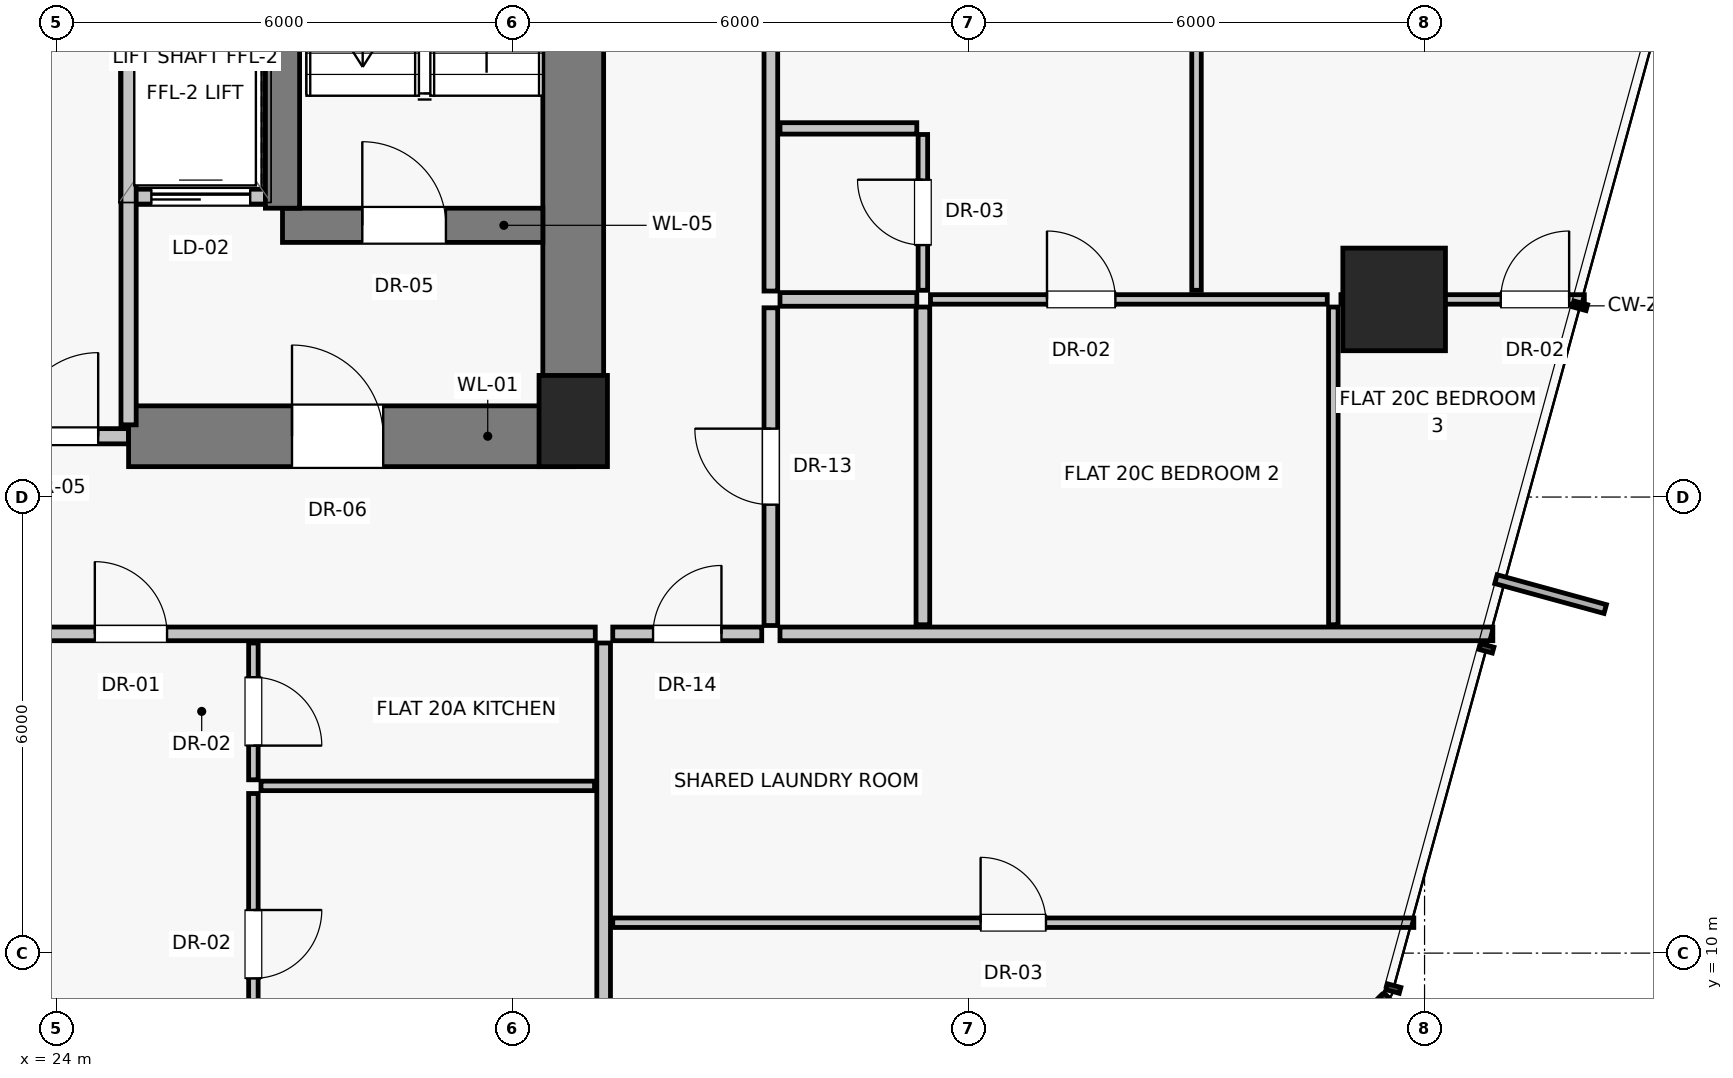
"""IFC4 building model, lengths in metres.
Left out: names, types, materials, properties, quantities, classifications, styles, units other than length and angle.
Written with IfcOpenShell. Run it as: python <this file> out.ifc"""

import sys

from ifc_helpers import new_model, si_unit, direction, frame, frame_2d, origin, origin_2d, place, context, subcontext, project, spatial, rectangle, extrude, source, transform, mapped, element, fill, save


model = new_model("IFC4")
c1 = context("Model", 3, precision=1e-05, world=origin(), true_north=direction((0.0, 1.0)))
c2 = subcontext(c1, "Body", "Model", "MODEL_VIEW")
j1 = project(units=[si_unit("LENGTHUNIT", "METRE"), si_unit("PLANEANGLEUNIT", "RADIAN")], contexts=[c1])
p1 = place(None, origin())
s1 = spatial("IfcSite", under=j1, at=p1, CompositionType="ELEMENT")
p2 = place(p1, origin())
s2 = spatial("IfcBuilding", under=s1, at=p2, CompositionType="ELEMENT")
p3 = place(p2, frame((0.0, 0.0, 73.85)))
s3 = spatial("IfcBuildingStorey", under=s2, at=p3, CompositionType="ELEMENT", Elevation=73.85)
p4 = place(p3, frame((30.8, 17.0, 0.0), z_axis=(0.0, 0.0, 1.0), x_axis=(1.0, 0.0, 0.0)))
e1 = element("IfcColumn", 1, at=p4, inside=s3, PredefinedType="PILASTER", context=c2, shape_type="SweptSolid", body=[
    extrude(rectangle(XDim=0.9, YDim=1.2, at=origin_2d()), origin(), (0.0, 0.0, 1.0), 3.25),
])
p5 = place(p3, frame((41.6, 18.6, 0.0), z_axis=(0.0, 0.0, 1.0), x_axis=(1.0, 0.0, 0.0)))
e2 = element("IfcColumn", 2, at=p5, inside=s3, PredefinedType="COLUMN", context=c2, shape_type="SweptSolid", body=[
    extrude(rectangle(XDim=1.35, YDim=1.35, at=origin_2d()), origin(), (0.0, 0.0, 1.0), 3.25),
])
p6 = place(p3, frame((30.8, 16.8, 0.0), z_axis=(0.0, 0.0, 1.0), x_axis=(0.0, 1.0, 0.0)))
e3 = element("IfcWall", 3, at=p6, inside=s3, PredefinedType="SHEAR", context=c2, shape_type="SweptSolid", body=[
    extrude(rectangle(XDim=14.2, YDim=0.8, at=frame_2d((7.1, 0.0))), origin(), (0.0, 0.0, 1.0), 3.0),
])
p7 = place(p3, frame((23.05, 16.8, 0.0), z_axis=(0.0, 0.0, 1.0), x_axis=(1.0, 0.0, 0.0)))
e4 = element("IfcWall", 4, at=p7, inside=s3, PredefinedType="SOLIDWALL", context=c2, shape_type="SweptSolid", body=[
    extrude(rectangle(XDim=1.9, YDim=0.2, at=frame_2d((0.95, 0.0))), origin(), (0.0, 0.0, 1.0), 2.15),
])
p8 = place(p7, frame((0.4, 0.0, 0.0)))
e5 = element("IfcOpeningElement", 5, at=p8, cuts=e4, PredefinedType="OPENING", context=c2, shape_type="SweptSolid", body=[
    extrude(rectangle(XDim=1.1, YDim=2.03, at=frame_2d((0.55, 1.015))), frame((0.0, 0.11, 0.0), z_axis=(0.0, -1.0, 0.0), x_axis=(1.0, 0.0, 0.0)), (0.0, 0.0, 1.0), 0.22),
])
p9 = place(p3, frame((24.95, 16.8, 0.0), z_axis=(0.0, 0.0, 1.0), x_axis=(1.0, 0.0, 0.0)))
e6 = element("IfcWall", 6, at=p9, inside=s3, PredefinedType="SHEAR", context=c2, shape_type="SweptSolid", body=[
    extrude(rectangle(XDim=5.85, YDim=0.8, at=frame_2d((2.925, 0.0))), origin(), (0.0, 0.0, 1.0), 3.0),
])
p10 = place(p9, frame((2.15, 0.0, 0.0)))
e7 = element("IfcOpeningElement", 7, at=p10, cuts=e6, PredefinedType="OPENING", context=c2, shape_type="SweptSolid", body=[
    extrude(rectangle(XDim=1.2, YDim=2.03, at=frame_2d((0.6, 1.015))), frame((0.0, 0.41, 0.0), z_axis=(0.0, -1.0, 0.0), x_axis=(1.0, 0.0, 0.0)), (0.0, 0.0, 1.0), 0.82),
])
p11 = place(p3, frame((24.95, 19.95, 0.0), z_axis=(0.0, 0.0, 1.0), x_axis=(1.0, 0.0, 0.0)))
e8 = element("IfcWall", 8, at=p11, inside=s3, PredefinedType="SOLIDWALL", context=c2, shape_type="SweptSolid", body=[
    extrude(rectangle(XDim=1.85, YDim=0.2, at=frame_2d((0.925, 0.0))), origin(), (0.0, 0.0, 1.0), 3.0),
])
p12 = place(p11, frame((0.3, 0.0, 0.0)))
e9 = element("IfcOpeningElement", 9, at=p12, cuts=e8, PredefinedType="OPENING", context=c2, shape_type="SweptSolid", body=[
    extrude(rectangle(XDim=1.3, YDim=2.25, at=frame_2d((0.65, 1.125))), frame((0.0, 0.11, 0.0), z_axis=(0.0, -1.0, 0.0), x_axis=(1.0, 0.0, 0.0)), (0.0, 0.0, 1.0), 0.22),
])
p13 = place(p3, frame((26.975, 19.575, 0.0), z_axis=(0.0, 0.0, 1.0), x_axis=(1.0, 0.0, 0.0)))
e10 = element("IfcWall", 10, at=p13, inside=s3, PredefinedType="SHEAR", context=c2, shape_type="SweptSolid", body=[
    extrude(rectangle(XDim=3.425, YDim=0.45, at=frame_2d((1.712, 0.0))), origin(), (0.0, 0.0, 1.0), 3.0),
])
p14 = place(p13, frame((1.05, 0.0, 0.0)))
e11 = element("IfcOpeningElement", 11, at=p14, cuts=e10, PredefinedType="OPENING", context=c2, shape_type="SweptSolid", body=[
    extrude(rectangle(XDim=1.1, YDim=2.03, at=frame_2d((0.55, 1.015))), frame((0.0, 0.235, 0.0), z_axis=(0.0, -1.0, 0.0), x_axis=(1.0, 0.0, 0.0)), (0.0, 0.0, 1.0), 0.47),
])
p15 = place(p3, frame((26.975, 19.8, 0.0), z_axis=(0.0, 0.0, 1.0), x_axis=(0.0, 1.0, 0.0)))
e12 = element("IfcWall", 12, at=p15, inside=s3, PredefinedType="SHEAR", context=c2, shape_type="SweptSolid", body=[
    extrude(rectangle(XDim=8.825, YDim=0.45, at=frame_2d((4.413, 0.0))), origin(), (0.0, 0.0, 1.0), 3.0),
])
p16 = place(p3, frame((24.95, 16.95, 0.0), z_axis=(0.0, 0.0, 1.0), x_axis=(0.0, 1.0, 0.0)))
e13 = element("IfcWall", 13, at=p16, inside=s3, PredefinedType="SOLIDWALL", context=c2, shape_type="SweptSolid", body=[
    extrude(rectangle(XDim=5.6, YDim=0.2, at=frame_2d((2.8, 0.0))), origin(), (0.0, 0.0, 1.0), 3.0),
])
p17 = place(p3, frame((31.2, 14.08, 0.0), z_axis=(0.0, 0.0, 1.0), x_axis=(0.0, -1.0, 0.0)))
e14 = element("IfcWall", 14, at=p17, inside=s3, PredefinedType="PARTITIONING", context=c2, shape_type="SweptSolid", body=[
    extrude(rectangle(XDim=9.71, YDim=0.18, at=frame_2d((4.855, 0.0))), origin(), (0.0, 0.0, 1.0), 3.0),
])
p18 = place(p3, frame((21.23, 14.2, 0.0), z_axis=(0.0, 0.0, 1.0), x_axis=(1.0, 0.0, 0.0)))
e15 = element("IfcWall", 15, at=p18, inside=s3, PredefinedType="PARTITIONING", context=c2, shape_type="SweptSolid", body=[
    extrude(rectangle(XDim=9.86, YDim=0.18, at=frame_2d((4.93, 0.0))), origin(), (0.0, 0.0, 1.0), 3.0),
])
p19 = place(p18, frame((3.276, 0.0, 0.0)))
e16 = element("IfcOpeningElement", 16, at=p19, cuts=e15, PredefinedType="OPENING", context=c2, shape_type="SweptSolid", body=[
    extrude(rectangle(XDim=0.95, YDim=2.02, at=frame_2d((0.475, 1.01))), frame((0.0, 0.1, 0.0), z_axis=(0.0, -1.0, 0.0), x_axis=(1.0, 0.0, 0.0)), (0.0, 0.0, 1.0), 0.2),
])
p20 = place(p3, frame((26.592, 14.08, 0.0), z_axis=(0.0, 0.0, 1.0), x_axis=(0.0, -1.0, 0.0)))
e17 = element("IfcWall", 17, at=p20, inside=s3, PredefinedType="PARTITIONING", context=c2, shape_type="SweptSolid", body=[
    extrude(rectangle(XDim=1.8, YDim=0.125, at=frame_2d((0.9, 0.0))), origin(), (0.0, 0.0, 1.0), 3.0),
])
p21 = place(p20, frame((0.45, 0.0, 0.0)))
e18 = element("IfcOpeningElement", 18, at=p21, cuts=e17, PredefinedType="OPENING", context=c2, shape_type="SweptSolid", body=[
    extrude(rectangle(XDim=0.9, YDim=2.01, at=frame_2d((0.45, 1.005))), frame((0.0, 0.073, 0.0), z_axis=(0.0, -1.0, 0.0), x_axis=(1.0, 0.0, 0.0)), (0.0, 0.0, 1.0), 0.145),
])
p22 = place(p3, frame((26.692, 12.2, 0.0), z_axis=(0.0, 0.0, 1.0), x_axis=(1.0, 0.0, 0.0)))
e19 = element("IfcWall", 19, at=p22, inside=s3, PredefinedType="PARTITIONING", context=c2, shape_type="SweptSolid", body=[
    extrude(rectangle(XDim=4.388, YDim=0.125, at=frame_2d((2.194, 0.0))), origin(), (0.0, 0.0, 1.0), 3.0),
])
p23 = place(p3, frame((26.592, 12.1, 0.0), z_axis=(0.0, 0.0, 1.0), x_axis=(0.0, -1.0, 0.0)))
e20 = element("IfcWall", 20, at=p23, inside=s3, PredefinedType="PARTITIONING", context=c2, shape_type="SweptSolid", body=[
    extrude(rectangle(XDim=5.22, YDim=0.125, at=frame_2d((2.61, 0.0))), origin(), (0.0, 0.0, 1.0), 3.0),
])
p24 = place(p23, frame((1.533, 0.0, 0.0)))
e21 = element("IfcOpeningElement", 21, at=p24, cuts=e20, PredefinedType="OPENING", context=c2, shape_type="SweptSolid", body=[
    extrude(rectangle(XDim=0.9, YDim=2.01, at=frame_2d((0.45, 1.005))), frame((0.0, 0.073, 0.0), z_axis=(0.0, -1.0, 0.0), x_axis=(1.0, 0.0, 0.0)), (0.0, 0.0, 1.0), 0.145),
])
p25 = place(p3, frame((33.52, 14.2, 0.0), z_axis=(0.0, 0.0, 1.0), x_axis=(1.0, 0.0, 0.0)))
e22 = element("IfcWall", 22, at=p25, inside=s3, PredefinedType="PARTITIONING", context=c2, shape_type="SweptSolid", body=[
    extrude(rectangle(XDim=9.378, YDim=0.18, at=frame_2d((4.689, 0.0))), origin(), (0.0, 0.0, 1.0), 3.0),
])
p26 = place(p3, frame((33.4, 14.31, 0.0), z_axis=(0.0, 0.0, 1.0), x_axis=(0.0, 1.0, 0.0)))
e23 = element("IfcWall", 23, at=p26, inside=s3, PredefinedType="PARTITIONING", context=c2, shape_type="SweptSolid", body=[
    extrude(rectangle(XDim=4.18, YDim=0.18, at=frame_2d((2.09, 0.0))), origin(), (0.0, 0.0, 1.0), 3.0),
])
p27 = place(p26, frame((1.59, 0.0, 0.0)))
e24 = element("IfcOpeningElement", 24, at=p27, cuts=e23, PredefinedType="OPENING", context=c2, shape_type="SweptSolid", body=[
    extrude(rectangle(XDim=1.0, YDim=2.01, at=frame_2d((0.5, 1.005))), frame((0.0, 0.1, 0.0), z_axis=(0.0, -1.0, 0.0), x_axis=(1.0, 0.0, 0.0)), (0.0, 0.0, 1.0), 0.2),
])
p28 = place(p3, frame((33.4, 18.71, 0.0), z_axis=(0.0, 0.0, 1.0), x_axis=(0.0, 1.0, 0.0)))
e25 = element("IfcWall", 25, at=p28, inside=s3, PredefinedType="PARTITIONING", context=c2, shape_type="SweptSolid", body=[
    extrude(rectangle(XDim=14.78, YDim=0.18, at=frame_2d((7.39, 0.0))), origin(), (0.0, 0.0, 1.0), 3.0),
])
p29 = place(p28, frame((5.94, 0.0, 0.0)))
e26 = element("IfcOpeningElement", 26, at=p29, cuts=e25, PredefinedType="OPENING", context=c2, shape_type="SweptSolid", body=[
    extrude(rectangle(XDim=0.95, YDim=2.02, at=frame_2d((0.475, 1.01))), frame((0.0, 0.1, 0.0), z_axis=(0.0, -1.0, 0.0), x_axis=(1.0, 0.0, 0.0)), (0.0, 0.0, 1.0), 0.2),
])
p30 = place(p3, frame((40.8, 14.32, 0.0), z_axis=(0.0, 0.0, 1.0), x_axis=(0.0, 1.0, 0.0)))
e27 = element("IfcWall", 27, at=p30, inside=s3, PredefinedType="PARTITIONING", context=c2, shape_type="SweptSolid", body=[
    extrude(rectangle(XDim=4.18, YDim=0.125, at=frame_2d((2.09, 0.0))), origin(), (0.0, 0.0, 1.0), 3.0),
])
p31 = place(p3, frame((40.9, 18.6, 0.0), z_axis=(0.0, 0.0, 1.0), x_axis=(1.0, 0.0, 0.0)))
e28 = element("IfcWall", 28, at=p31, inside=s3, PredefinedType="PARTITIONING", context=c2, shape_type="SweptSolid", body=[
    extrude(rectangle(XDim=3.202, YDim=0.125, at=frame_2d((1.601, 0.0))), origin(), (0.0, 0.0, 1.0), 2.299),
])
p32 = place(p31, frame((2.102, 0.0, 0.0)))
e29 = element("IfcOpeningElement", 29, at=p32, cuts=e28, PredefinedType="OPENING", context=c2, shape_type="SweptSolid", body=[
    extrude(rectangle(XDim=0.9, YDim=2.01, at=frame_2d((0.45, 1.005))), frame((0.0, 0.073, 0.0), z_axis=(0.0, -1.0, 0.0), x_axis=(1.0, 0.0, 0.0)), (0.0, 0.0, 1.0), 0.145),
])
p33 = place(p3, frame((39.0, 18.72, 0.0), z_axis=(0.0, 0.0, 1.0), x_axis=(0.0, 1.0, 0.0)))
e30 = element("IfcWall", 30, at=p33, inside=s3, PredefinedType="PARTITIONING", context=c2, shape_type="SweptSolid", body=[
    extrude(rectangle(XDim=10.56, YDim=0.125, at=frame_2d((5.28, 0.0))), origin(), (0.0, 0.0, 1.0), 3.0),
])
p34 = place(p33, frame((4.78, 0.0, 0.0)))
e31 = element("IfcOpeningElement", 31, at=p34, cuts=e30, PredefinedType="OPENING", context=c2, shape_type="SweptSolid", body=[
    extrude(rectangle(XDim=1.0, YDim=2.01, at=frame_2d((0.5, 1.005))), frame((0.0, 0.073, 0.0), z_axis=(0.0, -1.0, 0.0), x_axis=(1.0, 0.0, 0.0)), (0.0, 0.0, 1.0), 0.145),
])
p35 = place(p3, frame((35.4, 14.32, 0.0), z_axis=(0.0, 0.0, 1.0), x_axis=(0.0, 1.0, 0.0)))
e32 = element("IfcWall", 32, at=p35, inside=s3, PredefinedType="PARTITIONING", context=c2, shape_type="SweptSolid", body=[
    extrude(rectangle(XDim=4.18, YDim=0.18, at=frame_2d((2.09, 0.0))), origin(), (0.0, 0.0, 1.0), 3.0),
])
p36 = place(p3, frame((33.52, 18.6, 0.0), z_axis=(0.0, 0.0, 1.0), x_axis=(1.0, 0.0, 0.0)))
e33 = element("IfcWall", 33, at=p36, inside=s3, PredefinedType="PARTITIONING", context=c2, shape_type="SweptSolid", body=[
    extrude(rectangle(XDim=1.8, YDim=0.18, at=frame_2d((0.9, 0.0))), origin(), (0.0, 0.0, 1.0), 3.0),
])
p37 = place(p3, frame((35.5, 18.6, 0.0), z_axis=(0.0, 0.0, 1.0), x_axis=(1.0, 0.0, 0.0)))
e34 = element("IfcWall", 34, at=p37, inside=s3, PredefinedType="PARTITIONING", context=c2, shape_type="SweptSolid", body=[
    extrude(rectangle(XDim=5.22, YDim=0.125, at=frame_2d((2.61, 0.0))), origin(), (0.0, 0.0, 1.0), 2.299),
])
p38 = place(p37, frame((1.533, 0.0, 0.0)))
e35 = element("IfcOpeningElement", 35, at=p38, cuts=e34, PredefinedType="OPENING", context=c2, shape_type="SweptSolid", body=[
    extrude(rectangle(XDim=0.9, YDim=2.01, at=frame_2d((0.45, 1.005))), frame((0.0, 0.073, 0.0), z_axis=(0.0, -1.0, 0.0), x_axis=(1.0, 0.0, 0.0)), (0.0, 0.0, 1.0), 0.145),
])
p39 = place(p3, frame((33.52, 20.85, 0.0), z_axis=(0.0, 0.0, 1.0), x_axis=(1.0, 0.0, 0.0)))
e36 = element("IfcWall", 36, at=p39, inside=s3, PredefinedType="PARTITIONING", context=c2, shape_type="SweptSolid", body=[
    extrude(rectangle(XDim=1.8, YDim=0.15, at=frame_2d((0.9, 0.0))), origin(), (0.0, 0.0, 1.0), 3.0),
])
p40 = place(p3, frame((35.4, 18.72, 0.0), z_axis=(0.0, 0.0, 1.0), x_axis=(0.0, 1.0, 0.0)))
e37 = element("IfcWall", 37, at=p40, inside=s3, PredefinedType="PARTITIONING", context=c2, shape_type="SweptSolid", body=[
    extrude(rectangle(XDim=2.05, YDim=0.125, at=frame_2d((1.025, 0.0))), origin(), (0.0, 0.0, 1.0), 3.0),
])
p41 = place(p40, frame((0.595, 0.0, 0.0)))
e38 = element("IfcOpeningElement", 38, at=p41, cuts=e37, PredefinedType="OPENING", context=c2, shape_type="SweptSolid", body=[
    extrude(rectangle(XDim=0.86, YDim=2.01, at=frame_2d((0.43, 1.005))), frame((0.0, 0.073, 0.0), z_axis=(0.0, -1.0, 0.0), x_axis=(1.0, 0.0, 0.0)), (0.0, 0.0, 1.0), 0.145),
])
p42 = place(p3, frame((31.32, 14.2, 0.0), z_axis=(0.0, 0.0, 1.0), x_axis=(1.0, 0.0, 0.0)))
e39 = element("IfcWall", 39, at=p42, inside=s3, PredefinedType="PARTITIONING", context=c2, shape_type="SweptSolid", body=[
    extrude(rectangle(XDim=1.96, YDim=0.18, at=frame_2d((0.98, 0.0))), origin(), (0.0, 0.0, 1.0), 3.0),
])
p43 = place(p42, frame((0.53, 0.0, 0.0)))
e40 = element("IfcOpeningElement", 40, at=p43, cuts=e39, PredefinedType="OPENING", context=c2, shape_type="SweptSolid", body=[
    extrude(rectangle(XDim=0.9, YDim=2.01, at=frame_2d((0.45, 1.005))), frame((0.0, 0.1, 0.0), z_axis=(0.0, -1.0, 0.0), x_axis=(1.0, 0.0, 0.0)), (0.0, 0.0, 1.0), 0.2),
])
p44 = place(p3, frame((31.32, 10.4, 0.0), z_axis=(0.0, 0.0, 1.0), x_axis=(1.0, 0.0, 0.0)))
e41 = element("IfcWall", 41, at=p44, inside=s3, PredefinedType="PARTITIONING", context=c2, shape_type="SweptSolid", body=[
    extrude(rectangle(XDim=10.539, YDim=0.125, at=frame_2d((5.27, 0.0))), origin(), (0.0, 0.0, 1.0), 3.0),
])
p45 = place(p44, frame((4.84, 0.0, 0.0)))
e42 = element("IfcOpeningElement", 42, at=p45, cuts=e41, PredefinedType="OPENING", context=c2, shape_type="SweptSolid", body=[
    extrude(rectangle(XDim=0.86, YDim=2.01, at=frame_2d((0.43, 1.005))), frame((0.0, 0.073, 0.0), z_axis=(0.0, -1.0, 0.0), x_axis=(1.0, 0.0, 0.0)), (0.0, 0.0, 1.0), 0.145),
])
m1 = source(origin(), c2, "Body", "SweptSolid", [
    extrude(rectangle(XDim=1.1, YDim=2.03, at=frame_2d((0.55, 1.015))), frame((0.0, 0.025, 0.0), z_axis=(0.0, -1.0, 0.0), x_axis=(1.0, 0.0, 0.0)), (0.0, 0.0, 1.0), 0.05),
])
p46 = place(p8, origin())
e43 = element("IfcDoor", 43, at=p46, inside=s3, OperationType="SINGLE_SWING_RIGHT", PredefinedType="DOOR", context=c2, shape_type="MappedRepresentation", body=[
    mapped(m1, transform((0.0, 0.0, 0.0), scale=1.0)),
])
fill(e5, e43)
m2 = source(origin(), c2, "Body", "SweptSolid", [
    extrude(rectangle(XDim=1.2, YDim=2.03, at=frame_2d((0.6, 1.015))), frame((0.0, 0.025, 0.0), z_axis=(0.0, -1.0, 0.0), x_axis=(1.0, 0.0, 0.0)), (0.0, 0.0, 1.0), 0.05),
])
p47 = place(p10, origin())
e44 = element("IfcDoor", 44, at=p47, inside=s3, OperationType="SINGLE_SWING_LEFT", PredefinedType="DOOR", context=c2, shape_type="MappedRepresentation", body=[
    mapped(m2, transform((0.0, 0.0, 0.0), scale=1.0)),
])
fill(e7, e44)
m3 = source(origin(), c2, "Body", "SweptSolid", [
    extrude(rectangle(XDim=1.3, YDim=2.25, at=frame_2d((0.65, 1.125))), frame((0.0, 0.025, 0.0), z_axis=(0.0, -1.0, 0.0), x_axis=(1.0, 0.0, 0.0)), (0.0, 0.0, 1.0), 0.05),
])
p48 = place(p12, origin())
e45 = element("IfcDoor", 45, at=p48, inside=s3, OperationType="SLIDING_TO_LEFT", PredefinedType="DOOR", context=c2, shape_type="MappedRepresentation", body=[
    mapped(m3, transform((0.0, 0.0, 0.0), scale=1.0)),
])
fill(e9, e45)
p49 = place(p14, origin())
e46 = element("IfcDoor", 46, at=p49, inside=s3, OperationType="SINGLE_SWING_LEFT", PredefinedType="DOOR", context=c2, shape_type="MappedRepresentation", body=[
    mapped(m1, transform((0.0, 0.0, 0.0), scale=1.0)),
])
fill(e11, e46)
m4 = source(origin(), c2, "Body", "SweptSolid", [
    extrude(rectangle(XDim=0.95, YDim=2.02, at=frame_2d((0.475, 1.01))), frame((0.0, 0.025, 0.0), z_axis=(0.0, -1.0, 0.0), x_axis=(1.0, 0.0, 0.0)), (0.0, 0.0, 1.0), 0.05),
])
p50 = place(p19, origin())
e47 = element("IfcDoor", 47, at=p50, inside=s3, OperationType="SINGLE_SWING_LEFT", PredefinedType="DOOR", context=c2, shape_type="MappedRepresentation", body=[
    mapped(m4, transform((0.0, 0.0, 0.0), scale=1.0)),
])
fill(e16, e47)
m5 = source(origin(), c2, "Body", "SweptSolid", [
    extrude(rectangle(XDim=0.9, YDim=2.01, at=frame_2d((0.45, 1.005))), frame((0.0, 0.025, 0.0), z_axis=(0.0, -1.0, 0.0), x_axis=(1.0, 0.0, 0.0)), (0.0, 0.0, 1.0), 0.05),
])
p51 = place(p21, origin())
e48 = element("IfcDoor", 48, at=p51, inside=s3, OperationType="SINGLE_SWING_RIGHT", PredefinedType="DOOR", context=c2, shape_type="MappedRepresentation", body=[
    mapped(m5, transform((0.0, 0.0, 0.0), scale=1.0)),
])
fill(e18, e48)
p52 = place(p24, origin())
e49 = element("IfcDoor", 49, at=p52, inside=s3, OperationType="SINGLE_SWING_LEFT", PredefinedType="DOOR", context=c2, shape_type="MappedRepresentation", body=[
    mapped(m5, transform((0.0, 0.0, 0.0), scale=1.0)),
])
fill(e21, e49)
m6 = source(origin(), c2, "Body", "SweptSolid", [
    extrude(rectangle(XDim=1.0, YDim=2.01, at=frame_2d((0.5, 1.005))), frame((0.0, 0.025, 0.0), z_axis=(0.0, -1.0, 0.0), x_axis=(1.0, 0.0, 0.0)), (0.0, 0.0, 1.0), 0.05),
])
p53 = place(p27, origin())
e50 = element("IfcDoor", 50, at=p53, inside=s3, OperationType="SINGLE_SWING_RIGHT", PredefinedType="DOOR", context=c2, shape_type="MappedRepresentation", body=[
    mapped(m6, transform((0.0, 0.0, 0.0), scale=1.0)),
])
fill(e24, e50)
p54 = place(p32, origin())
e51 = element("IfcDoor", 51, at=p54, inside=s3, OperationType="SINGLE_SWING_RIGHT", PredefinedType="DOOR", context=c2, shape_type="MappedRepresentation", body=[
    mapped(m5, transform((0.0, 0.0, 0.0), scale=1.0)),
])
fill(e29, e51)
p55 = place(p38, origin())
e52 = element("IfcDoor", 52, at=p55, inside=s3, OperationType="SINGLE_SWING_LEFT", PredefinedType="DOOR", context=c2, shape_type="MappedRepresentation", body=[
    mapped(m5, transform((0.0, 0.0, 0.0), scale=1.0)),
])
fill(e35, e52)
m7 = source(origin(), c2, "Body", "SweptSolid", [
    extrude(rectangle(XDim=0.86, YDim=2.01, at=frame_2d((0.43, 1.005))), frame((0.0, 0.025, 0.0), z_axis=(0.0, -1.0, 0.0), x_axis=(1.0, 0.0, 0.0)), (0.0, 0.0, 1.0), 0.05),
])
p56 = place(p41, origin())
e53 = element("IfcDoor", 53, at=p56, inside=s3, OperationType="SINGLE_SWING_RIGHT", PredefinedType="DOOR", context=c2, shape_type="MappedRepresentation", body=[
    mapped(m7, transform((0.0, 0.0, 0.0), scale=1.0)),
])
fill(e38, e53)
p57 = place(p43, origin())
e54 = element("IfcDoor", 54, at=p57, inside=s3, OperationType="SINGLE_SWING_RIGHT", PredefinedType="DOOR", context=c2, shape_type="MappedRepresentation", body=[
    mapped(m5, transform((0.0, 0.0, 0.0), scale=1.0)),
])
fill(e40, e54)
p58 = place(p45, origin())
e55 = element("IfcDoor", 55, at=p58, inside=s3, OperationType="SINGLE_SWING_LEFT", PredefinedType="DOOR", context=c2, shape_type="MappedRepresentation", body=[
    mapped(m7, transform((0.0, 0.0, 0.0), scale=1.0)),
])
fill(e42, e55)
save(model, sys.argv[1])
